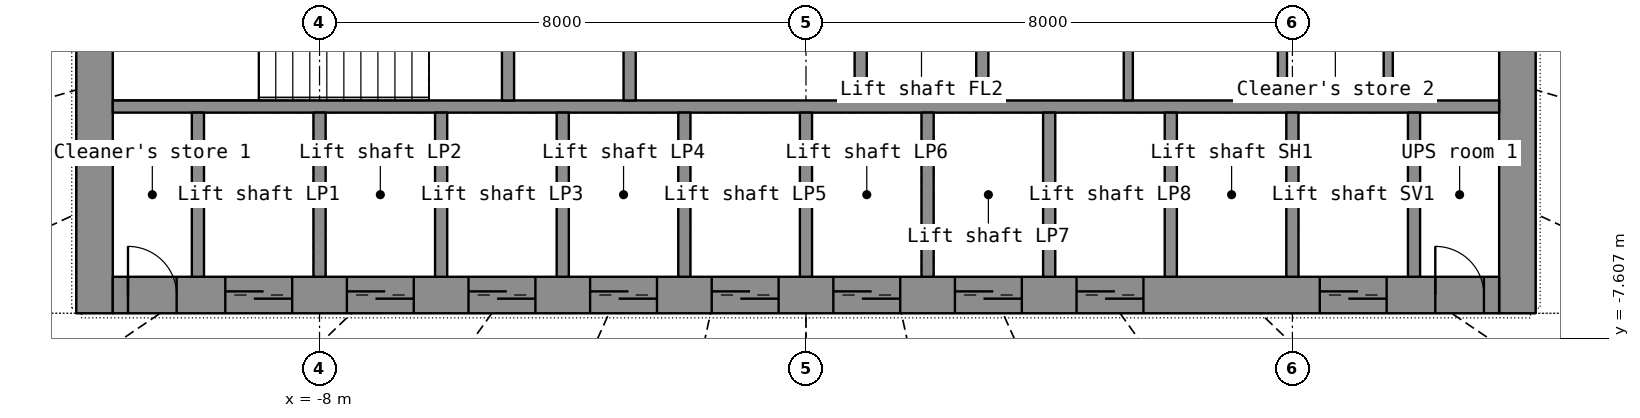
"""IFC4 building model, lengths in metres.
Left out: names, types, materials, properties, quantities, classifications, styles, units other than length and angle.
Written with IfcOpenShell. Run it as: python <this file> out.ifc"""

import sys

from ifc_helpers import new_model, si_unit, direction, frame, frame_2d, origin, place, context, subcontext, project, spatial, rectangle, extrude, element, fill, save


model = new_model("IFC4")
c1 = context("Model", 3, precision=1e-05, world=origin(), true_north=direction((0.0, 1.0)))
c2 = subcontext(c1, "Body", "Model", "MODEL_VIEW")
j1 = project(units=[si_unit("LENGTHUNIT", "METRE"), si_unit("PLANEANGLEUNIT", "RADIAN")], contexts=[c1])
p1 = place(None, origin())
s1 = spatial("IfcSite", under=j1, at=p1, CompositionType="ELEMENT")
p2 = place(p1, origin())
s2 = spatial("IfcBuilding", under=s1, at=p2, CompositionType="ELEMENT")
p3 = place(p2, frame((0.0, 0.0, 70.4)))
s3 = spatial("IfcBuildingStorey", under=s2, at=p3, CompositionType="ELEMENT", Elevation=70.4)
p4 = place(p3, frame((-11.7, -7.2, 0.0), z_axis=(0.0, 0.0, 1.0), x_axis=(0.0, 1.0, 0.0)))
e1 = element("IfcWall", 1, at=p4, inside=s3, PredefinedType="SHEAR", context=c2, shape_type="SweptSolid", body=[
    extrude(rectangle(XDim=14.4, YDim=0.6, at=frame_2d((7.2, 0.0))), origin(), (0.0, 0.0, 1.0), 3.3),
])
p5 = place(p4, frame((6.5, 0.0, 0.0)))
e2 = element("IfcOpeningElement", 2, at=p5, cuts=e1, PredefinedType="OPENING", context=c2, shape_type="SweptSolid", body=[
    extrude(rectangle(XDim=1.4, YDim=2.2, at=frame_2d((0.7, 1.1))), frame((0.0, 0.31, 0.0), z_axis=(0.0, -1.0, 0.0), x_axis=(1.0, 0.0, 0.0)), (0.0, 0.0, 1.0), 0.62),
])
p6 = place(p3, frame((11.7, -7.2, 0.0), z_axis=(0.0, 0.0, 1.0), x_axis=(0.0, 1.0, 0.0)))
e3 = element("IfcWall", 3, at=p6, inside=s3, PredefinedType="SHEAR", context=c2, shape_type="SweptSolid", body=[
    extrude(rectangle(XDim=14.4, YDim=0.6, at=frame_2d((7.2, 0.0))), origin(), (0.0, 0.0, 1.0), 3.3),
])
p7 = place(p6, frame((6.5, 0.0, 0.0)))
e4 = element("IfcOpeningElement", 4, at=p7, cuts=e3, PredefinedType="OPENING", context=c2, shape_type="SweptSolid", body=[
    extrude(rectangle(XDim=1.4, YDim=2.2, at=frame_2d((0.7, 1.1))), frame((0.0, 0.31, 0.0), z_axis=(0.0, -1.0, 0.0), x_axis=(1.0, 0.0, 0.0)), (0.0, 0.0, 1.0), 0.62),
])
p8 = place(p3, frame((-11.4, -6.9, 0.0), z_axis=(0.0, 0.0, 1.0), x_axis=(1.0, 0.0, 0.0)))
e5 = element("IfcWall", 5, at=p8, inside=s3, PredefinedType="SHEAR", context=c2, shape_type="SweptSolid", body=[
    extrude(rectangle(XDim=22.8, YDim=0.6, at=frame_2d((11.4, 0.0))), origin(), (0.0, 0.0, 1.0), 3.3),
])
p9 = place(p8, frame((1.85, 0.0, 0.0)))
e6 = element("IfcOpeningElement", 6, at=p9, cuts=e5, PredefinedType="OPENING", context=c2, shape_type="SweptSolid", body=[
    extrude(rectangle(XDim=1.1, YDim=2.2, at=frame_2d((0.55, 1.1))), frame((0.0, 0.31, 0.0), z_axis=(0.0, -1.0, 0.0), x_axis=(1.0, 0.0, 0.0)), (0.0, 0.0, 1.0), 0.62),
])
p10 = place(p8, frame((3.85, 0.0, 0.0)))
e7 = element("IfcOpeningElement", 7, at=p10, cuts=e5, PredefinedType="OPENING", context=c2, shape_type="SweptSolid", body=[
    extrude(rectangle(XDim=1.1, YDim=2.2, at=frame_2d((0.55, 1.1))), frame((0.0, 0.31, 0.0), z_axis=(0.0, -1.0, 0.0), x_axis=(1.0, 0.0, 0.0)), (0.0, 0.0, 1.0), 0.62),
])
p11 = place(p8, frame((5.85, 0.0, 0.0)))
e8 = element("IfcOpeningElement", 8, at=p11, cuts=e5, PredefinedType="OPENING", context=c2, shape_type="SweptSolid", body=[
    extrude(rectangle(XDim=1.1, YDim=2.2, at=frame_2d((0.55, 1.1))), frame((0.0, 0.31, 0.0), z_axis=(0.0, -1.0, 0.0), x_axis=(1.0, 0.0, 0.0)), (0.0, 0.0, 1.0), 0.62),
])
p12 = place(p8, frame((7.85, 0.0, 0.0)))
e9 = element("IfcOpeningElement", 9, at=p12, cuts=e5, PredefinedType="OPENING", context=c2, shape_type="SweptSolid", body=[
    extrude(rectangle(XDim=1.1, YDim=2.2, at=frame_2d((0.55, 1.1))), frame((0.0, 0.31, 0.0), z_axis=(0.0, -1.0, 0.0), x_axis=(1.0, 0.0, 0.0)), (0.0, 0.0, 1.0), 0.62),
])
p13 = place(p8, frame((9.85, 0.0, 0.0)))
e10 = element("IfcOpeningElement", 10, at=p13, cuts=e5, PredefinedType="OPENING", context=c2, shape_type="SweptSolid", body=[
    extrude(rectangle(XDim=1.1, YDim=2.2, at=frame_2d((0.55, 1.1))), frame((0.0, 0.31, 0.0), z_axis=(0.0, -1.0, 0.0), x_axis=(1.0, 0.0, 0.0)), (0.0, 0.0, 1.0), 0.62),
])
p14 = place(p8, frame((11.85, 0.0, 0.0)))
e11 = element("IfcOpeningElement", 11, at=p14, cuts=e5, PredefinedType="OPENING", context=c2, shape_type="SweptSolid", body=[
    extrude(rectangle(XDim=1.1, YDim=2.2, at=frame_2d((0.55, 1.1))), frame((0.0, 0.31, 0.0), z_axis=(0.0, -1.0, 0.0), x_axis=(1.0, 0.0, 0.0)), (0.0, 0.0, 1.0), 0.62),
])
p15 = place(p8, frame((13.85, 0.0, 0.0)))
e12 = element("IfcOpeningElement", 12, at=p15, cuts=e5, PredefinedType="OPENING", context=c2, shape_type="SweptSolid", body=[
    extrude(rectangle(XDim=1.1, YDim=2.2, at=frame_2d((0.55, 1.1))), frame((0.0, 0.31, 0.0), z_axis=(0.0, -1.0, 0.0), x_axis=(1.0, 0.0, 0.0)), (0.0, 0.0, 1.0), 0.62),
])
p16 = place(p8, frame((15.85, 0.0, 0.0)))
e13 = element("IfcOpeningElement", 13, at=p16, cuts=e5, PredefinedType="OPENING", context=c2, shape_type="SweptSolid", body=[
    extrude(rectangle(XDim=1.1, YDim=2.2, at=frame_2d((0.55, 1.1))), frame((0.0, 0.31, 0.0), z_axis=(0.0, -1.0, 0.0), x_axis=(1.0, 0.0, 0.0)), (0.0, 0.0, 1.0), 0.62),
])
p17 = place(p8, frame((19.85, 0.0, 0.0)))
e14 = element("IfcOpeningElement", 14, at=p17, cuts=e5, PredefinedType="OPENING", context=c2, shape_type="SweptSolid", body=[
    extrude(rectangle(XDim=1.1, YDim=2.2, at=frame_2d((0.55, 1.1))), frame((0.0, 0.31, 0.0), z_axis=(0.0, -1.0, 0.0), x_axis=(1.0, 0.0, 0.0)), (0.0, 0.0, 1.0), 0.62),
])
p18 = place(p8, frame((0.25, 0.0, 0.0)))
e15 = element("IfcOpeningElement", 15, at=p18, cuts=e5, PredefinedType="OPENING", context=c2, shape_type="SweptSolid", body=[
    extrude(rectangle(XDim=0.8, YDim=2.05, at=frame_2d((0.4, 1.025))), frame((0.0, 0.31, 0.0), z_axis=(0.0, -1.0, 0.0), x_axis=(1.0, 0.0, 0.0)), (0.0, 0.0, 1.0), 0.62),
])
p19 = place(p8, frame((21.75, 0.0, 0.0)))
e16 = element("IfcOpeningElement", 16, at=p19, cuts=e5, PredefinedType="OPENING", context=c2, shape_type="SweptSolid", body=[
    extrude(rectangle(XDim=0.8, YDim=2.05, at=frame_2d((0.4, 1.025))), frame((0.0, 0.31, 0.0), z_axis=(0.0, -1.0, 0.0), x_axis=(1.0, 0.0, 0.0)), (0.0, 0.0, 1.0), 0.62),
])
p20 = place(p3, frame((-11.4, -3.8, 0.0), z_axis=(0.0, 0.0, 1.0), x_axis=(1.0, 0.0, 0.0)))
e17 = element("IfcWall", 17, at=p20, inside=s3, PredefinedType="SHEAR", context=c2, shape_type="SweptSolid", body=[
    extrude(rectangle(XDim=22.8, YDim=0.2, at=frame_2d((11.4, 0.0))), origin(), (0.0, 0.0, 1.0), 3.3),
])
for number, where, z_axis, x_axis in (
    (18, (-10.0, -6.6, 0.0), (0.0, 0.0, 1.0), (0.0, 1.0, 0.0)),
    (19, (-8.0, -6.6, 0.0), (0.0, 0.0, 1.0), (0.0, 1.0, 0.0)),
    (20, (-6.0, -6.6, 0.0), (0.0, 0.0, 1.0), (0.0, 1.0, 0.0)),
    (21, (-4.0, -6.6, 0.0), (0.0, 0.0, 1.0), (0.0, 1.0, 0.0)),
    (22, (-2.0, -6.6, 0.0), (0.0, 0.0, 1.0), (0.0, 1.0, 0.0)),
    (23, (0.0, -6.6, 0.0), (0.0, 0.0, 1.0), (0.0, 1.0, 0.0)),
    (24, (2.0, -6.6, 0.0), (0.0, 0.0, 1.0), (0.0, 1.0, 0.0)),
    (25, (4.0, -6.6, 0.0), (0.0, 0.0, 1.0), (0.0, 1.0, 0.0)),
    (26, (6.0, -6.6, 0.0), (0.0, 0.0, 1.0), (0.0, 1.0, 0.0)),
    (27, (8.0, -6.6, 0.0), (0.0, 0.0, 1.0), (0.0, 1.0, 0.0)),
    (28, (10.0, -6.6, 0.0), (0.0, 0.0, 1.0), (0.0, 1.0, 0.0)),
):
    element("IfcWall", number, at=place(p3, frame(where, z_axis=z_axis, x_axis=x_axis)), inside=s3, PredefinedType="SHEAR", context=c2, shape_type="SweptSolid", body=[
        extrude(rectangle(XDim=2.7, YDim=0.2, at=frame_2d((1.35, 0.0))), origin(), (0.0, 0.0, 1.0), 3.3),
    ])
p21 = place(p3, frame((-2.9, -3.7, 0.0), z_axis=(0.0, 0.0, 1.0), x_axis=(0.0, 1.0, 0.0)))
e29 = element("IfcWall", 29, at=p21, inside=s3, PredefinedType="SHEAR", context=c2, shape_type="SweptSolid", body=[
    extrude(rectangle(XDim=7.4, YDim=0.2, at=frame_2d((3.7, 0.0))), origin(), (0.0, 0.0, 1.0), 3.3),
])
p22 = place(p21, frame((3.1, 0.0, 0.0)))
e30 = element("IfcOpeningElement", 30, at=p22, cuts=e29, PredefinedType="OPENING", context=c2, shape_type="SweptSolid", body=[
    extrude(rectangle(XDim=1.2, YDim=2.2, at=frame_2d((0.6, 1.1))), frame((0.0, 0.11, 0.0), z_axis=(0.0, -1.0, 0.0), x_axis=(1.0, 0.0, 0.0)), (0.0, 0.0, 1.0), 0.22),
])
p23 = place(p3, frame((2.9, -3.7, 0.0), z_axis=(0.0, 0.0, 1.0), x_axis=(0.0, 1.0, 0.0)))
e31 = element("IfcWall", 31, at=p23, inside=s3, PredefinedType="SHEAR", context=c2, shape_type="SweptSolid", body=[
    extrude(rectangle(XDim=7.4, YDim=0.2, at=frame_2d((3.7, 0.0))), origin(), (0.0, 0.0, 1.0), 3.3),
])
p24 = place(p23, frame((3.1, 0.0, 0.0)))
e32 = element("IfcOpeningElement", 32, at=p24, cuts=e31, PredefinedType="OPENING", context=c2, shape_type="SweptSolid", body=[
    extrude(rectangle(XDim=1.2, YDim=2.2, at=frame_2d((0.6, 1.1))), frame((0.0, 0.11, 0.0), z_axis=(0.0, -1.0, 0.0), x_axis=(1.0, 0.0, 0.0)), (0.0, 0.0, 1.0), 0.22),
])
for number, where, z_axis, x_axis in (
    (33, (0.9, -3.7, 0.0), (0.0, 0.0, 1.0), (0.0, 1.0, 0.0)),
    (34, (-4.9, -3.7, 0.0), (0.0, 0.0, 1.0), (0.0, 1.0, 0.0)),
):
    element("IfcWall", number, at=place(p3, frame(where, z_axis=z_axis, x_axis=x_axis)), inside=s3, PredefinedType="SHEAR", context=c2, shape_type="SweptSolid", body=[
        extrude(rectangle(XDim=2.35, YDim=0.2, at=frame_2d((1.175, 0.0))), origin(), (0.0, 0.0, 1.0), 3.3),
    ])
for number, where, z_axis, x_axis in (
    (35, (5.301, -3.7, 0.0), (0.0, 0.0, 1.0), (0.0, 1.0, 0.0)),
    (36, (7.836, -3.7, 0.0), (0.0, 0.0, 1.0), (0.0, 1.0, 0.0)),
    (37, (9.576, -3.7, 0.0), (0.0, 0.0, 1.0), (0.0, 1.0, 0.0)),
):
    element("IfcWall", number, at=place(p3, frame(where, z_axis=z_axis, x_axis=x_axis)), inside=s3, PredefinedType="PARTITIONING", context=c2, shape_type="SweptSolid", body=[
        extrude(rectangle(XDim=2.35, YDim=0.15, at=frame_2d((1.175, 0.0))), origin(), (0.0, 0.0, 1.0), 3.3),
    ])
p25 = place(p9, origin())
e38 = element("IfcDoor", 38, at=p25, inside=s3, OperationType="DOUBLE_DOOR_SLIDING", PredefinedType="DOOR", context=c2, shape_type="SweptSolid", body=[
    extrude(rectangle(XDim=1.1, YDim=2.2, at=frame_2d((0.55, 1.1))), frame((0.0, 0.025, 0.0), z_axis=(0.0, -1.0, 0.0), x_axis=(1.0, 0.0, 0.0)), (0.0, 0.0, 1.0), 0.05),
])
fill(e6, e38)
p26 = place(p10, origin())
e39 = element("IfcDoor", 39, at=p26, inside=s3, OperationType="DOUBLE_DOOR_SLIDING", PredefinedType="DOOR", context=c2, shape_type="SweptSolid", body=[
    extrude(rectangle(XDim=1.1, YDim=2.2, at=frame_2d((0.55, 1.1))), frame((0.0, 0.025, 0.0), z_axis=(0.0, -1.0, 0.0), x_axis=(1.0, 0.0, 0.0)), (0.0, 0.0, 1.0), 0.05),
])
fill(e7, e39)
p27 = place(p11, origin())
e40 = element("IfcDoor", 40, at=p27, inside=s3, OperationType="DOUBLE_DOOR_SLIDING", PredefinedType="DOOR", context=c2, shape_type="SweptSolid", body=[
    extrude(rectangle(XDim=1.1, YDim=2.2, at=frame_2d((0.55, 1.1))), frame((0.0, 0.025, 0.0), z_axis=(0.0, -1.0, 0.0), x_axis=(1.0, 0.0, 0.0)), (0.0, 0.0, 1.0), 0.05),
])
fill(e8, e40)
p28 = place(p12, origin())
e41 = element("IfcDoor", 41, at=p28, inside=s3, OperationType="DOUBLE_DOOR_SLIDING", PredefinedType="DOOR", context=c2, shape_type="SweptSolid", body=[
    extrude(rectangle(XDim=1.1, YDim=2.2, at=frame_2d((0.55, 1.1))), frame((0.0, 0.025, 0.0), z_axis=(0.0, -1.0, 0.0), x_axis=(1.0, 0.0, 0.0)), (0.0, 0.0, 1.0), 0.05),
])
fill(e9, e41)
p29 = place(p13, origin())
e42 = element("IfcDoor", 42, at=p29, inside=s3, OperationType="DOUBLE_DOOR_SLIDING", PredefinedType="DOOR", context=c2, shape_type="SweptSolid", body=[
    extrude(rectangle(XDim=1.1, YDim=2.2, at=frame_2d((0.55, 1.1))), frame((0.0, 0.025, 0.0), z_axis=(0.0, -1.0, 0.0), x_axis=(1.0, 0.0, 0.0)), (0.0, 0.0, 1.0), 0.05),
])
fill(e10, e42)
p30 = place(p14, origin())
e43 = element("IfcDoor", 43, at=p30, inside=s3, OperationType="DOUBLE_DOOR_SLIDING", PredefinedType="DOOR", context=c2, shape_type="SweptSolid", body=[
    extrude(rectangle(XDim=1.1, YDim=2.2, at=frame_2d((0.55, 1.1))), frame((0.0, 0.025, 0.0), z_axis=(0.0, -1.0, 0.0), x_axis=(1.0, 0.0, 0.0)), (0.0, 0.0, 1.0), 0.05),
])
fill(e11, e43)
p31 = place(p15, origin())
e44 = element("IfcDoor", 44, at=p31, inside=s3, OperationType="DOUBLE_DOOR_SLIDING", PredefinedType="DOOR", context=c2, shape_type="SweptSolid", body=[
    extrude(rectangle(XDim=1.1, YDim=2.2, at=frame_2d((0.55, 1.1))), frame((0.0, 0.025, 0.0), z_axis=(0.0, -1.0, 0.0), x_axis=(1.0, 0.0, 0.0)), (0.0, 0.0, 1.0), 0.05),
])
fill(e12, e44)
p32 = place(p16, origin())
e45 = element("IfcDoor", 45, at=p32, inside=s3, OperationType="DOUBLE_DOOR_SLIDING", PredefinedType="DOOR", context=c2, shape_type="SweptSolid", body=[
    extrude(rectangle(XDim=1.1, YDim=2.2, at=frame_2d((0.55, 1.1))), frame((0.0, 0.025, 0.0), z_axis=(0.0, -1.0, 0.0), x_axis=(1.0, 0.0, 0.0)), (0.0, 0.0, 1.0), 0.05),
])
fill(e13, e45)
p33 = place(p17, origin())
e46 = element("IfcDoor", 46, at=p33, inside=s3, OperationType="DOUBLE_DOOR_SLIDING", PredefinedType="DOOR", context=c2, shape_type="SweptSolid", body=[
    extrude(rectangle(XDim=1.1, YDim=2.2, at=frame_2d((0.55, 1.1))), frame((0.0, 0.025, 0.0), z_axis=(0.0, -1.0, 0.0), x_axis=(1.0, 0.0, 0.0)), (0.0, 0.0, 1.0), 0.05),
])
fill(e14, e46)
p34 = place(p18, origin())
e47 = element("IfcDoor", 47, at=p34, inside=s3, OperationType="SINGLE_SWING_LEFT", PredefinedType="DOOR", context=c2, shape_type="SweptSolid", body=[
    extrude(rectangle(XDim=0.8, YDim=2.05, at=frame_2d((0.4, 1.025))), frame((0.0, 0.025, 0.0), z_axis=(0.0, -1.0, 0.0), x_axis=(1.0, 0.0, 0.0)), (0.0, 0.0, 1.0), 0.05),
])
fill(e15, e47)
p35 = place(p19, origin())
e48 = element("IfcDoor", 48, at=p35, inside=s3, OperationType="SINGLE_SWING_LEFT", PredefinedType="DOOR", context=c2, shape_type="SweptSolid", body=[
    extrude(rectangle(XDim=0.8, YDim=2.05, at=frame_2d((0.4, 1.025))), frame((0.0, 0.025, 0.0), z_axis=(0.0, -1.0, 0.0), x_axis=(1.0, 0.0, 0.0)), (0.0, 0.0, 1.0), 0.05),
])
fill(e16, e48)
save(model, sys.argv[1])
